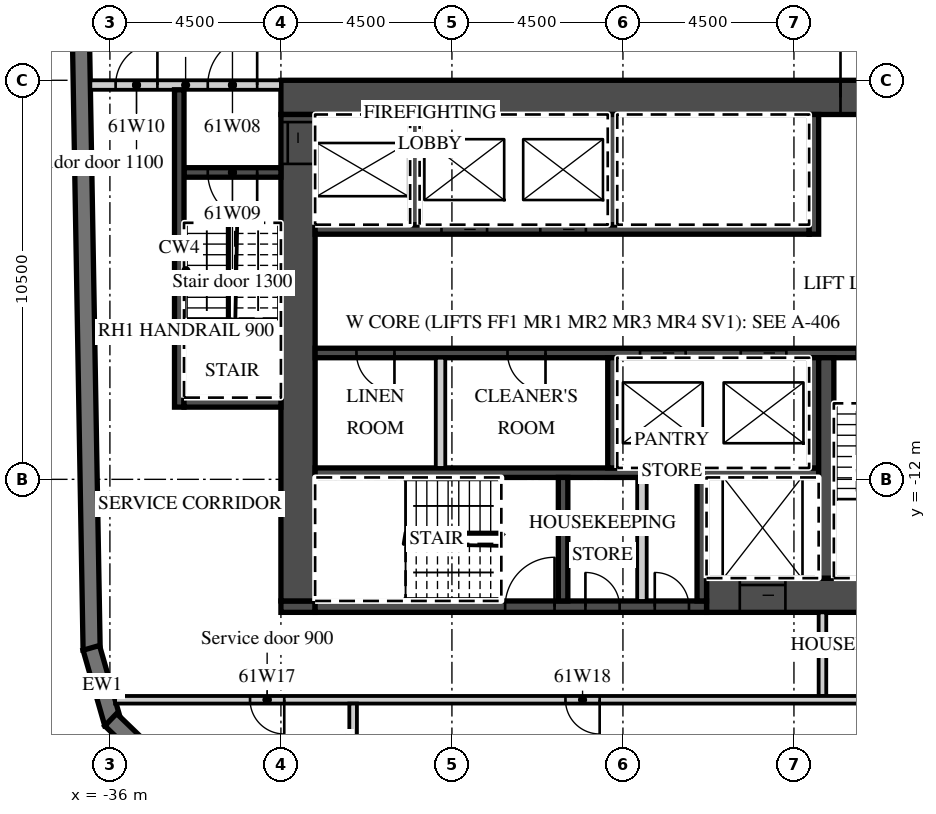
"""IFC4 building model, lengths in metres.
Left out: names, types, materials, properties, quantities, classifications, styles, units other than length and angle.
Written with IfcOpenShell. Run it as: python <this file> out.ifc"""

import sys

from ifc_helpers import new_model, si_unit, direction, frame, frame_2d, origin, place, context, subcontext, project, spatial, polyline, rectangle, outline, extrude, element, fill, save


model = new_model("IFC4")
c1 = context("Model", 3, precision=1e-05, world=origin(), true_north=direction((0.0, 1.0)))
c2 = subcontext(c1, "Body", "Model", "MODEL_VIEW")
j1 = project(units=[si_unit("LENGTHUNIT", "METRE"), si_unit("PLANEANGLEUNIT", "RADIAN")], contexts=[c1])
p1 = place(None, origin())
s1 = spatial("IfcSite", under=j1, at=p1, CompositionType="ELEMENT")
p2 = place(p1, origin())
s2 = spatial("IfcBuilding", under=s1, at=p2, CompositionType="ELEMENT")
p3 = place(p2, frame((0.0, 0.0, 247.4)))
s3 = spatial("IfcBuildingStorey", under=s2, at=p3, CompositionType="ELEMENT", Elevation=247.4)
p4 = place(p3, frame((-37.057, 16.503, 0.0), z_axis=(0.0, 0.0, 1.0), x_axis=(0.017452279857, -0.999847697366, 0.0)))
e1 = element("IfcWall", 1, at=p4, inside=s3, PredefinedType="SOLIDWALL", context=c2, shape_type="SweptSolid", body=[
    extrude(rectangle(XDim=33.0, YDim=0.45, at=frame_2d((16.5, 0.0))), origin(), (0.0, 0.0, 1.0), 3.02),
])
p5 = place(p3, frame((-36.49, -16.434, 0.0), z_axis=(0.0, 0.0, 1.0), x_axis=(0.275577603096, -0.961278827745, 0.0)))
e2 = element("IfcWall", 2, at=p5, inside=s3, PredefinedType="SOLIDWALL", context=c2, shape_type="SweptSolid", body=[
    extrude(outline(polyline([(0.0, -0.225), (2.071, -0.225), (1.95, 0.225), (0.121, 0.225), (0.0, -0.225)])), origin(), (0.0, 0.0, 1.0), 3.02),
])
p6 = place(p3, frame((-35.979, -18.324, 0.0), z_axis=(0.0, 0.0, 1.0), x_axis=(0.719320193998, -0.694678672846, 0.0)))
e3 = element("IfcWall", 3, at=p6, inside=s3, PredefinedType="SOLIDWALL", context=c2, shape_type="SweptSolid", body=[
    extrude(outline(polyline([(0.0, -0.225), (2.071, -0.225), (1.95, 0.225), (0.121, 0.225), (0.0, -0.225)])), origin(), (0.0, 0.0, 1.0), 3.02),
])
p7 = place(p3, frame((-31.5, -1.95, 0.0), z_axis=(0.0, 0.0, 1.0), x_axis=(1.0, 0.0, 0.0)))
e4 = element("IfcWall", 4, at=p7, inside=s3, PredefinedType="SHEAR", context=c2, shape_type="SweptSolid", body=[
    extrude(rectangle(XDim=18.0, YDim=0.9, at=frame_2d((9.0, 0.0))), origin(), (0.0, 0.0, 1.0), 3.02),
])
p8 = place(p7, frame((14.725, 0.0, 0.0)))
e5 = element("IfcOpeningElement", 5, at=p8, cuts=e4, PredefinedType="OPENING", context=c2, shape_type="SweptSolid", body=[
    extrude(rectangle(XDim=1.8, YDim=2.1, at=frame_2d((0.9, 1.05))), frame((0.0, 0.46, 0.0), z_axis=(0.0, -1.0, 0.0), x_axis=(1.0, 0.0, 0.0)), (0.0, 0.0, 1.0), 0.92),
])
p9 = place(p3, frame((-20.3, -15.05, 0.0), z_axis=(0.0, 0.0, 1.0), x_axis=(1.0, 0.0, 0.0)))
e6 = element("IfcWall", 6, at=p9, inside=s3, PredefinedType="SHEAR", context=c2, shape_type="SweptSolid", body=[
    extrude(rectangle(XDim=6.8, YDim=0.9, at=frame_2d((3.4, 0.0))), origin(), (0.0, 0.0, 1.0), 3.02),
])
p10 = place(p9, frame((0.875, 0.0, 0.0)))
e7 = element("IfcOpeningElement", 7, at=p10, cuts=e6, PredefinedType="OPENING", context=c2, shape_type="SweptSolid", body=[
    extrude(rectangle(XDim=1.2, YDim=2.1, at=frame_2d((0.6, 1.05))), frame((0.0, 0.46, 0.0), z_axis=(0.0, -1.0, 0.0), x_axis=(1.0, 0.0, 0.0)), (0.0, 0.0, 1.0), 0.92),
])
p11 = place(p3, frame((-31.5, -15.35, 0.0), z_axis=(0.0, 0.0, 1.0), x_axis=(1.0, 0.0, 0.0)))
e8 = element("IfcWall", 8, at=p11, inside=s3, PredefinedType="SHEAR", context=c2, shape_type="SweptSolid", body=[
    extrude(rectangle(XDim=0.9, YDim=0.3, at=frame_2d((0.45, 0.0))), origin(), (0.0, 0.0, 1.0), 3.02),
])
p12 = place(p3, frame((-30.6, -15.35, 0.0), z_axis=(0.0, 0.0, 1.0), x_axis=(1.0, 0.0, 0.0)))
e9 = element("IfcWall", 9, at=p12, inside=s3, PredefinedType="SHEAR", context=c2, shape_type="SweptSolid", body=[
    extrude(rectangle(XDim=10.3, YDim=0.3, at=frame_2d((5.15, 0.0))), origin(), (0.0, 0.0, 1.0), 3.02),
])
p13 = place(p12, frame((5.0, 0.0, 0.0)))
e10 = element("IfcOpeningElement", 10, at=p13, cuts=e9, PredefinedType="OPENING", context=c2, shape_type="SweptSolid", body=[
    extrude(rectangle(XDim=1.3, YDim=2.1, at=frame_2d((0.65, 1.05))), frame((0.0, 0.16, 0.0), z_axis=(0.0, -1.0, 0.0), x_axis=(1.0, 0.0, 0.0)), (0.0, 0.0, 1.0), 0.32),
])
p14 = place(p12, frame((7.113, 0.0, 0.0)))
e11 = element("IfcOpeningElement", 11, at=p14, cuts=e9, PredefinedType="OPENING", context=c2, shape_type="SweptSolid", body=[
    extrude(rectangle(XDim=0.9, YDim=2.1, at=frame_2d((0.45, 1.05))), frame((0.0, 0.16, 0.0), z_axis=(0.0, -1.0, 0.0), x_axis=(1.0, 0.0, 0.0)), (0.0, 0.0, 1.0), 0.32),
])
p15 = place(p12, frame((8.938, 0.0, 0.0)))
e12 = element("IfcOpeningElement", 12, at=p15, cuts=e9, PredefinedType="OPENING", context=c2, shape_type="SweptSolid", body=[
    extrude(rectangle(XDim=0.9, YDim=2.1, at=frame_2d((0.45, 1.05))), frame((0.0, 0.16, 0.0), z_axis=(0.0, -1.0, 0.0), x_axis=(1.0, 0.0, 0.0)), (0.0, 0.0, 1.0), 0.32),
])
p16 = place(p3, frame((-31.05, -15.2, 0.0), z_axis=(0.0, 0.0, 1.0), x_axis=(0.0, 1.0, 0.0)))
e13 = element("IfcWall", 13, at=p16, inside=s3, PredefinedType="SHEAR", context=c2, shape_type="SweptSolid", body=[
    extrude(rectangle(XDim=12.8, YDim=0.9, at=frame_2d((6.4, 0.0))), origin(), (0.0, 0.0, 1.0), 3.02),
])
p17 = place(p16, frame((11.5, 0.0, 0.0)))
e14 = element("IfcOpeningElement", 14, at=p17, cuts=e13, PredefinedType="OPENING", context=c2, shape_type="SweptSolid", body=[
    extrude(rectangle(XDim=1.1, YDim=2.1, at=frame_2d((0.55, 1.05))), frame((0.0, 0.46, 0.0), z_axis=(0.0, -1.0, 0.0), x_axis=(1.0, 0.0, 0.0)), (0.0, 0.0, 1.0), 0.92),
])
p18 = place(p3, frame((-30.6, -5.425, 0.0), z_axis=(0.0, 0.0, 1.0), x_axis=(1.0, 0.0, 0.0)))
e15 = element("IfcWall", 15, at=p18, inside=s3, PredefinedType="SHEAR", context=c2, shape_type="SweptSolid", body=[
    extrude(rectangle(XDim=13.0, YDim=0.25, at=frame_2d((6.5, 0.0))), origin(), (0.0, 0.0, 1.0), 3.02),
])
p19 = place(p18, frame((3.325, 0.0, 0.0)))
e16 = element("IfcOpeningElement", 16, at=p19, cuts=e15, PredefinedType="OPENING", context=c2, shape_type="SweptSolid", body=[
    extrude(rectangle(XDim=1.2, YDim=2.1, at=frame_2d((0.6, 1.05))), frame((0.0, 0.135, 0.0), z_axis=(0.0, -1.0, 0.0), x_axis=(1.0, 0.0, 0.0)), (0.0, 0.0, 1.0), 0.27),
])
p20 = place(p18, frame((5.925, 0.0, 0.0)))
e17 = element("IfcOpeningElement", 17, at=p20, cuts=e15, PredefinedType="OPENING", context=c2, shape_type="SweptSolid", body=[
    extrude(rectangle(XDim=1.2, YDim=2.1, at=frame_2d((0.6, 1.05))), frame((0.0, 0.135, 0.0), z_axis=(0.0, -1.0, 0.0), x_axis=(1.0, 0.0, 0.0)), (0.0, 0.0, 1.0), 0.27),
])
p21 = place(p3, frame((-17.475, -5.55, 0.0), z_axis=(0.0, 0.0, 1.0), x_axis=(0.0, 1.0, 0.0)))
e18 = element("IfcWall", 18, at=p21, inside=s3, PredefinedType="SHEAR", context=c2, shape_type="SweptSolid", body=[
    extrude(rectangle(XDim=3.15, YDim=0.25, at=frame_2d((1.575, 0.0))), origin(), (0.0, 0.0, 1.0), 3.02),
])
for number, where, z_axis, x_axis in (
    (19, (-27.975, -5.3, 0.0), (0.0, 0.0, 1.0), (0.0, 1.0, 0.0)),
    (20, (-22.775, -5.3, 0.0), (0.0, 0.0, 1.0), (0.0, 1.0, 0.0)),
):
    element("IfcWall", number, at=place(p3, frame(where, z_axis=z_axis, x_axis=x_axis)), inside=s3, PredefinedType="SHEAR", context=c2, shape_type="SweptSolid", body=[
        extrude(rectangle(XDim=2.9, YDim=0.25, at=frame_2d((1.45, 0.0))), origin(), (0.0, 0.0, 1.0), 3.02),
    ])
p22 = place(p3, frame((-30.6, -8.675, 0.0), z_axis=(0.0, 0.0, 1.0), x_axis=(1.0, 0.0, 0.0)))
e21 = element("IfcWall", 21, at=p22, inside=s3, PredefinedType="SHEAR", context=c2, shape_type="SweptSolid", body=[
    extrude(rectangle(XDim=16.2, YDim=0.25, at=frame_2d((8.1, 0.0))), origin(), (0.0, 0.0, 1.0), 3.02),
])
p23 = place(p22, frame((8.55, 0.0, 0.0)))
e22 = element("IfcOpeningElement", 22, at=p23, cuts=e21, PredefinedType="OPENING", context=c2, shape_type="SweptSolid", body=[
    extrude(rectangle(XDim=1.2, YDim=2.1, at=frame_2d((0.6, 1.05))), frame((0.0, 0.135, 0.0), z_axis=(0.0, -1.0, 0.0), x_axis=(1.0, 0.0, 0.0)), (0.0, 0.0, 1.0), 0.27),
])
p24 = place(p22, frame((11.2, 0.0, 0.0)))
e23 = element("IfcOpeningElement", 23, at=p24, cuts=e21, PredefinedType="OPENING", context=c2, shape_type="SweptSolid", body=[
    extrude(rectangle(XDim=1.2, YDim=2.1, at=frame_2d((0.6, 1.05))), frame((0.0, 0.135, 0.0), z_axis=(0.0, -1.0, 0.0), x_axis=(1.0, 0.0, 0.0)), (0.0, 0.0, 1.0), 0.27),
])
p25 = place(p22, frame((14.25, 0.0, 0.0)))
e24 = element("IfcOpeningElement", 24, at=p25, cuts=e21, PredefinedType="OPENING", context=c2, shape_type="SweptSolid", body=[
    extrude(rectangle(XDim=1.3, YDim=2.1, at=frame_2d((0.65, 1.05))), frame((0.0, 0.135, 0.0), z_axis=(0.0, -1.0, 0.0), x_axis=(1.0, 0.0, 0.0)), (0.0, 0.0, 1.0), 0.27),
])
p26 = place(p22, frame((1.087, 0.0, 0.0)))
e25 = element("IfcOpeningElement", 25, at=p26, cuts=e21, PredefinedType="OPENING", context=c2, shape_type="SweptSolid", body=[
    extrude(rectangle(XDim=1.0, YDim=2.1, at=frame_2d((0.5, 1.05))), frame((0.0, 0.135, 0.0), z_axis=(0.0, -1.0, 0.0), x_axis=(1.0, 0.0, 0.0)), (0.0, 0.0, 1.0), 0.27),
])
p27 = place(p22, frame((5.062, 0.0, 0.0)))
e26 = element("IfcOpeningElement", 26, at=p27, cuts=e21, PredefinedType="OPENING", context=c2, shape_type="SweptSolid", body=[
    extrude(rectangle(XDim=1.0, YDim=2.1, at=frame_2d((0.5, 1.05))), frame((0.0, 0.135, 0.0), z_axis=(0.0, -1.0, 0.0), x_axis=(1.0, 0.0, 0.0)), (0.0, 0.0, 1.0), 0.27),
])
p28 = place(p3, frame((-30.6, -11.825, 0.0), z_axis=(0.0, 0.0, 1.0), x_axis=(1.0, 0.0, 0.0)))
e27 = element("IfcWall", 27, at=p28, inside=s3, PredefinedType="SHEAR", context=c2, shape_type="SweptSolid", body=[
    extrude(rectangle(XDim=13.25, YDim=0.25, at=frame_2d((6.625, 0.0))), origin(), (0.0, 0.0, 1.0), 3.02),
])
for number, where, z_axis, x_axis in (
    (28, (-17.475, -11.7, 0.0), (0.0, 0.0, 1.0), (0.0, 1.0, 0.0)),
    (29, (-22.775, -11.7, 0.0), (0.0, 0.0, 1.0), (0.0, 1.0, 0.0)),
):
    element("IfcWall", number, at=place(p3, frame(where, z_axis=z_axis, x_axis=x_axis)), inside=s3, PredefinedType="SHEAR", context=c2, shape_type="SweptSolid", body=[
        extrude(rectangle(XDim=2.9, YDim=0.25, at=frame_2d((1.45, 0.0))), origin(), (0.0, 0.0, 1.0), 3.02),
    ])
p29 = place(p3, frame((-27.3, -11.7, 0.0), z_axis=(0.0, 0.0, 1.0), x_axis=(0.0, 1.0, 0.0)))
e30 = element("IfcWall", 30, at=p29, inside=s3, PredefinedType="PARTITIONING", context=c2, shape_type="SweptSolid", body=[
    extrude(rectangle(XDim=2.9, YDim=0.25, at=frame_2d((1.45, 0.0))), origin(), (0.0, 0.0, 1.0), 3.02),
])
p30 = place(p3, frame((-17.15, -14.6, 0.0), z_axis=(0.0, 0.0, 1.0), x_axis=(0.0, 1.0, 0.0)))
e31 = element("IfcWall", 31, at=p30, inside=s3, PredefinedType="SHEAR", context=c2, shape_type="SweptSolid", body=[
    extrude(rectangle(XDim=5.8, YDim=0.4, at=frame_2d((2.9, 0.0))), origin(), (0.0, 0.0, 1.0), 3.02),
])
for number, where, z_axis, x_axis in (
    (32, (-20.425, -15.2, 0.0), (0.0, 0.0, 1.0), (0.0, 1.0, 0.0)),
    (33, (-24.075, -15.2, 0.0), (0.0, 0.0, 1.0), (0.0, 1.0, 0.0)),
):
    element("IfcWall", number, at=place(p3, frame(where, z_axis=z_axis, x_axis=x_axis)), inside=s3, PredefinedType="SHEAR", context=c2, shape_type="SweptSolid", body=[
        extrude(rectangle(XDim=3.25, YDim=0.25, at=frame_2d((1.625, 0.0))), origin(), (0.0, 0.0, 1.0), 3.02),
    ])
p31 = place(p3, frame((-22.0, -15.2, 0.0), z_axis=(0.0, 0.0, 1.0), x_axis=(0.0, 1.0, 0.0)))
e34 = element("IfcWall", 34, at=p31, inside=s3, PredefinedType="PARTITIONING", context=c2, shape_type="SweptSolid", body=[
    extrude(rectangle(XDim=3.25, YDim=0.25, at=frame_2d((1.625, 0.0))), origin(), (0.0, 0.0, 1.0), 3.02),
])
p32 = place(p3, frame((-36.515, -1.625, 0.0), z_axis=(0.0, 0.0, 1.0), x_axis=(1.0, 0.0, 0.0)))
e35 = element("IfcWall", 35, at=p32, inside=s3, PredefinedType="PARTITIONING", context=c2, shape_type="SweptSolid", body=[
    extrude(rectangle(XDim=5.015, YDim=0.25, at=frame_2d((2.508, 0.0))), origin(), (0.0, 0.0, 1.0), 3.02),
])
p33 = place(p32, frame((3.09, 0.0, 0.0)))
e36 = element("IfcOpeningElement", 36, at=p33, cuts=e35, PredefinedType="OPENING", context=c2, shape_type="SweptSolid", body=[
    extrude(rectangle(XDim=1.3, YDim=2.1, at=frame_2d((0.65, 1.05))), frame((0.0, 0.135, 0.0), z_axis=(0.0, -1.0, 0.0), x_axis=(1.0, 0.0, 0.0)), (0.0, 0.0, 1.0), 0.27),
])
p34 = place(p32, frame((0.665, 0.0, 0.0)))
e37 = element("IfcOpeningElement", 37, at=p34, cuts=e35, PredefinedType="OPENING", context=c2, shape_type="SweptSolid", body=[
    extrude(rectangle(XDim=1.1, YDim=2.1, at=frame_2d((0.55, 1.05))), frame((0.0, 0.135, 0.0), z_axis=(0.0, -1.0, 0.0), x_axis=(1.0, 0.0, 0.0)), (0.0, 0.0, 1.0), 0.27),
])
p35 = place(p3, frame((-34.05, -3.925, 0.0), z_axis=(0.0, 0.0, 1.0), x_axis=(1.0, 0.0, 0.0)))
e38 = element("IfcWall", 38, at=p35, inside=s3, PredefinedType="SHEAR", context=c2, shape_type="SweptSolid", body=[
    extrude(rectangle(XDim=2.55, YDim=0.25, at=frame_2d((1.275, 0.0))), origin(), (0.0, 0.0, 1.0), 3.02),
])
p36 = place(p35, frame((0.625, 0.0, 0.0)))
e39 = element("IfcOpeningElement", 39, at=p36, cuts=e38, PredefinedType="OPENING", context=c2, shape_type="SweptSolid", body=[
    extrude(rectangle(XDim=1.3, YDim=2.1, at=frame_2d((0.65, 1.05))), frame((0.0, 0.135, 0.0), z_axis=(0.0, -1.0, 0.0), x_axis=(1.0, 0.0, 0.0)), (0.0, 0.0, 1.0), 0.27),
])
p37 = place(p3, frame((-34.175, -10.1, 0.0), z_axis=(0.0, 0.0, 1.0), x_axis=(0.0, 1.0, 0.0)))
e40 = element("IfcWall", 40, at=p37, inside=s3, PredefinedType="SHEAR", context=c2, shape_type="SweptSolid", body=[
    extrude(rectangle(XDim=8.35, YDim=0.25, at=frame_2d((4.175, 0.0))), origin(), (0.0, 0.0, 1.0), 3.02),
])
p38 = place(p3, frame((-34.05, -9.975, 0.0), z_axis=(0.0, 0.0, 1.0), x_axis=(1.0, 0.0, 0.0)))
e41 = element("IfcWall", 41, at=p38, inside=s3, PredefinedType="SHEAR", context=c2, shape_type="SweptSolid", body=[
    extrude(rectangle(XDim=2.55, YDim=0.25, at=frame_2d((1.275, 0.0))), origin(), (0.0, 0.0, 1.0), 3.02),
])
p39 = place(p3, frame((-17.25, -17.7, 0.0), z_axis=(0.0, 0.0, 1.0), x_axis=(0.0, 1.0, 0.0)))
e42 = element("IfcWall", 42, at=p39, inside=s3, PredefinedType="PARTITIONING", context=c2, shape_type="SweptSolid", body=[
    extrude(rectangle(XDim=2.2, YDim=0.2, at=frame_2d((1.1, 0.0))), origin(), (0.0, 0.0, 1.0), 3.02),
])
p40 = place(p3, frame((-35.864, -17.8, 0.0), z_axis=(0.0, 0.0, 1.0), x_axis=(1.0, 0.0, 0.0)))
e43 = element("IfcWall", 43, at=p40, inside=s3, PredefinedType="PARTITIONING", context=c2, shape_type="SweptSolid", body=[
    extrude(rectangle(XDim=22.264, YDim=0.2, at=frame_2d((11.132, 0.0))), origin(), (0.0, 0.0, 1.0), 3.02),
])
p41 = place(p40, frame((3.551, 0.0, 0.0)))
e44 = element("IfcOpeningElement", 44, at=p41, cuts=e43, PredefinedType="OPENING", context=c2, shape_type="SweptSolid", body=[
    extrude(rectangle(XDim=0.9, YDim=2.1, at=frame_2d((0.45, 1.05))), frame((0.0, 0.11, 0.0), z_axis=(0.0, -1.0, 0.0), x_axis=(1.0, 0.0, 0.0)), (0.0, 0.0, 1.0), 0.22),
])
p42 = place(p40, frame((11.851, 0.0, 0.0)))
e45 = element("IfcOpeningElement", 45, at=p42, cuts=e43, PredefinedType="OPENING", context=c2, shape_type="SweptSolid", body=[
    extrude(rectangle(XDim=0.9, YDim=2.1, at=frame_2d((0.45, 1.05))), frame((0.0, 0.11, 0.0), z_axis=(0.0, -1.0, 0.0), x_axis=(1.0, 0.0, 0.0)), (0.0, 0.0, 1.0), 0.22),
])
p43 = place(p3, frame((-29.6, -19.922, 0.0), z_axis=(0.0, 0.0, 1.0), x_axis=(0.0, 1.0, 0.0)))
e46 = element("IfcWall", 46, at=p43, inside=s3, PredefinedType="PARTITIONING", context=c2, shape_type="SweptSolid", body=[
    extrude(rectangle(XDim=2.022, YDim=0.2, at=frame_2d((1.011, 0.0))), origin(), (0.0, 0.0, 1.0), 3.02),
])
p44 = place(p23, origin())
e47 = element("IfcDoor", 47, at=p44, inside=s3, OperationType="SLIDING_TO_LEFT", PredefinedType="DOOR", context=c2, shape_type="SweptSolid", body=[
    extrude(rectangle(XDim=1.2, YDim=2.1, at=frame_2d((0.6, 1.05))), frame((0.0, 0.025, 0.0), z_axis=(0.0, -1.0, 0.0), x_axis=(1.0, 0.0, 0.0)), (0.0, 0.0, 1.0), 0.05),
])
fill(e22, e47)
p45 = place(p24, origin())
e48 = element("IfcDoor", 48, at=p45, inside=s3, OperationType="SLIDING_TO_RIGHT", PredefinedType="DOOR", context=c2, shape_type="SweptSolid", body=[
    extrude(rectangle(XDim=1.2, YDim=2.1, at=frame_2d((0.6, 1.05))), frame((0.0, 0.025, 0.0), z_axis=(0.0, -1.0, 0.0), x_axis=(1.0, 0.0, 0.0)), (0.0, 0.0, 1.0), 0.05),
])
fill(e23, e48)
p46 = place(p19, origin())
e49 = element("IfcDoor", 49, at=p46, inside=s3, OperationType="SLIDING_TO_RIGHT", PredefinedType="DOOR", context=c2, shape_type="SweptSolid", body=[
    extrude(rectangle(XDim=1.2, YDim=2.1, at=frame_2d((0.6, 1.05))), frame((0.0, 0.025, 0.0), z_axis=(0.0, -1.0, 0.0), x_axis=(1.0, 0.0, 0.0)), (0.0, 0.0, 1.0), 0.05),
])
fill(e16, e49)
p47 = place(p20, origin())
e50 = element("IfcDoor", 50, at=p47, inside=s3, OperationType="SLIDING_TO_RIGHT", PredefinedType="DOOR", context=c2, shape_type="SweptSolid", body=[
    extrude(rectangle(XDim=1.2, YDim=2.1, at=frame_2d((0.6, 1.05))), frame((0.0, 0.025, 0.0), z_axis=(0.0, -1.0, 0.0), x_axis=(1.0, 0.0, 0.0)), (0.0, 0.0, 1.0), 0.05),
])
fill(e17, e50)
p48 = place(p10, origin())
e51 = element("IfcDoor", 51, at=p48, inside=s3, OperationType="SLIDING_TO_LEFT", PredefinedType="DOOR", context=c2, shape_type="SweptSolid", body=[
    extrude(rectangle(XDim=1.2, YDim=2.1, at=frame_2d((0.6, 1.05))), frame((0.0, 0.025, 0.0), z_axis=(0.0, -1.0, 0.0), x_axis=(1.0, 0.0, 0.0)), (0.0, 0.0, 1.0), 0.05),
])
fill(e7, e51)
p49 = place(p17, origin())
e52 = element("IfcDoor", 52, at=p49, inside=s3, OperationType="SLIDING_TO_RIGHT", PredefinedType="DOOR", context=c2, shape_type="SweptSolid", body=[
    extrude(rectangle(XDim=1.1, YDim=2.1, at=frame_2d((0.55, 1.05))), frame((0.0, 0.025, 0.0), z_axis=(0.0, -1.0, 0.0), x_axis=(1.0, 0.0, 0.0)), (0.0, 0.0, 1.0), 0.05),
])
fill(e14, e52)
p50 = place(p8, origin())
e53 = element("IfcDoor", 53, at=p50, inside=s3, OperationType="DOUBLE_DOOR_DOUBLE_SWING", PredefinedType="DOOR", context=c2, shape_type="SweptSolid", body=[
    extrude(rectangle(XDim=1.8, YDim=2.1, at=frame_2d((0.9, 1.05))), frame((0.0, 0.025, 0.0), z_axis=(0.0, -1.0, 0.0), x_axis=(1.0, 0.0, 0.0)), (0.0, 0.0, 1.0), 0.05),
])
fill(e5, e53)
p51 = place(p33, origin())
e54 = element("IfcDoor", 54, at=p51, inside=s3, OperationType="SINGLE_SWING_RIGHT", PredefinedType="DOOR", context=c2, shape_type="SweptSolid", body=[
    extrude(rectangle(XDim=1.3, YDim=2.1, at=frame_2d((0.65, 1.05))), frame((0.0, 0.025, 0.0), z_axis=(0.0, -1.0, 0.0), x_axis=(1.0, 0.0, 0.0)), (0.0, 0.0, 1.0), 0.05),
])
fill(e36, e54)
p52 = place(p36, origin())
e55 = element("IfcDoor", 55, at=p52, inside=s3, OperationType="SINGLE_SWING_RIGHT", PredefinedType="DOOR", context=c2, shape_type="SweptSolid", body=[
    extrude(rectangle(XDim=1.3, YDim=2.1, at=frame_2d((0.65, 1.05))), frame((0.0, 0.025, 0.0), z_axis=(0.0, -1.0, 0.0), x_axis=(1.0, 0.0, 0.0)), (0.0, 0.0, 1.0), 0.05),
])
fill(e39, e55)
p53 = place(p34, origin())
e56 = element("IfcDoor", 56, at=p53, inside=s3, OperationType="SINGLE_SWING_RIGHT", PredefinedType="DOOR", context=c2, shape_type="SweptSolid", body=[
    extrude(rectangle(XDim=1.1, YDim=2.1, at=frame_2d((0.55, 1.05))), frame((0.0, 0.025, 0.0), z_axis=(0.0, -1.0, 0.0), x_axis=(1.0, 0.0, 0.0)), (0.0, 0.0, 1.0), 0.05),
])
fill(e37, e56)
p54 = place(p25, origin())
e57 = element("IfcDoor", 57, at=p54, inside=s3, OperationType="SINGLE_SWING_RIGHT", PredefinedType="DOOR", context=c2, shape_type="SweptSolid", body=[
    extrude(rectangle(XDim=1.3, YDim=2.1, at=frame_2d((0.65, 1.05))), frame((0.0, 0.025, 0.0), z_axis=(0.0, -1.0, 0.0), x_axis=(1.0, 0.0, 0.0)), (0.0, 0.0, 1.0), 0.05),
])
fill(e24, e57)
p55 = place(p13, origin())
e58 = element("IfcDoor", 58, at=p55, inside=s3, OperationType="SINGLE_SWING_RIGHT", PredefinedType="DOOR", context=c2, shape_type="SweptSolid", body=[
    extrude(rectangle(XDim=1.3, YDim=2.1, at=frame_2d((0.65, 1.05))), frame((0.0, 0.025, 0.0), z_axis=(0.0, -1.0, 0.0), x_axis=(1.0, 0.0, 0.0)), (0.0, 0.0, 1.0), 0.05),
])
fill(e10, e58)
p56 = place(p14, origin())
e59 = element("IfcDoor", 59, at=p56, inside=s3, OperationType="SINGLE_SWING_LEFT", PredefinedType="DOOR", context=c2, shape_type="SweptSolid", body=[
    extrude(rectangle(XDim=0.9, YDim=2.1, at=frame_2d((0.45, 1.05))), frame((0.0, 0.025, 0.0), z_axis=(0.0, -1.0, 0.0), x_axis=(1.0, 0.0, 0.0)), (0.0, 0.0, 1.0), 0.05),
])
fill(e11, e59)
p57 = place(p15, origin())
e60 = element("IfcDoor", 60, at=p57, inside=s3, OperationType="SINGLE_SWING_LEFT", PredefinedType="DOOR", context=c2, shape_type="SweptSolid", body=[
    extrude(rectangle(XDim=0.9, YDim=2.1, at=frame_2d((0.45, 1.05))), frame((0.0, 0.025, 0.0), z_axis=(0.0, -1.0, 0.0), x_axis=(1.0, 0.0, 0.0)), (0.0, 0.0, 1.0), 0.05),
])
fill(e12, e60)
p58 = place(p26, origin())
e61 = element("IfcDoor", 61, at=p58, inside=s3, OperationType="SINGLE_SWING_RIGHT", PredefinedType="DOOR", context=c2, shape_type="SweptSolid", body=[
    extrude(rectangle(XDim=1.0, YDim=2.1, at=frame_2d((0.5, 1.05))), frame((0.0, 0.025, 0.0), z_axis=(0.0, -1.0, 0.0), x_axis=(1.0, 0.0, 0.0)), (0.0, 0.0, 1.0), 0.05),
])
fill(e25, e61)
p59 = place(p27, origin())
e62 = element("IfcDoor", 62, at=p59, inside=s3, OperationType="SINGLE_SWING_RIGHT", PredefinedType="DOOR", context=c2, shape_type="SweptSolid", body=[
    extrude(rectangle(XDim=1.0, YDim=2.1, at=frame_2d((0.5, 1.05))), frame((0.0, 0.025, 0.0), z_axis=(0.0, -1.0, 0.0), x_axis=(1.0, 0.0, 0.0)), (0.0, 0.0, 1.0), 0.05),
])
fill(e26, e62)
p60 = place(p41, origin())
e63 = element("IfcDoor", 63, at=p60, inside=s3, OperationType="SINGLE_SWING_RIGHT", PredefinedType="DOOR", context=c2, shape_type="SweptSolid", body=[
    extrude(rectangle(XDim=0.9, YDim=2.1, at=frame_2d((0.45, 1.05))), frame((0.0, 0.025, 0.0), z_axis=(0.0, -1.0, 0.0), x_axis=(1.0, 0.0, 0.0)), (0.0, 0.0, 1.0), 0.05),
])
fill(e44, e63)
p61 = place(p42, origin())
e64 = element("IfcDoor", 64, at=p61, inside=s3, OperationType="SINGLE_SWING_RIGHT", PredefinedType="DOOR", context=c2, shape_type="SweptSolid", body=[
    extrude(rectangle(XDim=0.9, YDim=2.1, at=frame_2d((0.45, 1.05))), frame((0.0, 0.025, 0.0), z_axis=(0.0, -1.0, 0.0), x_axis=(1.0, 0.0, 0.0)), (0.0, 0.0, 1.0), 0.05),
])
fill(e45, e64)
save(model, sys.argv[1])
